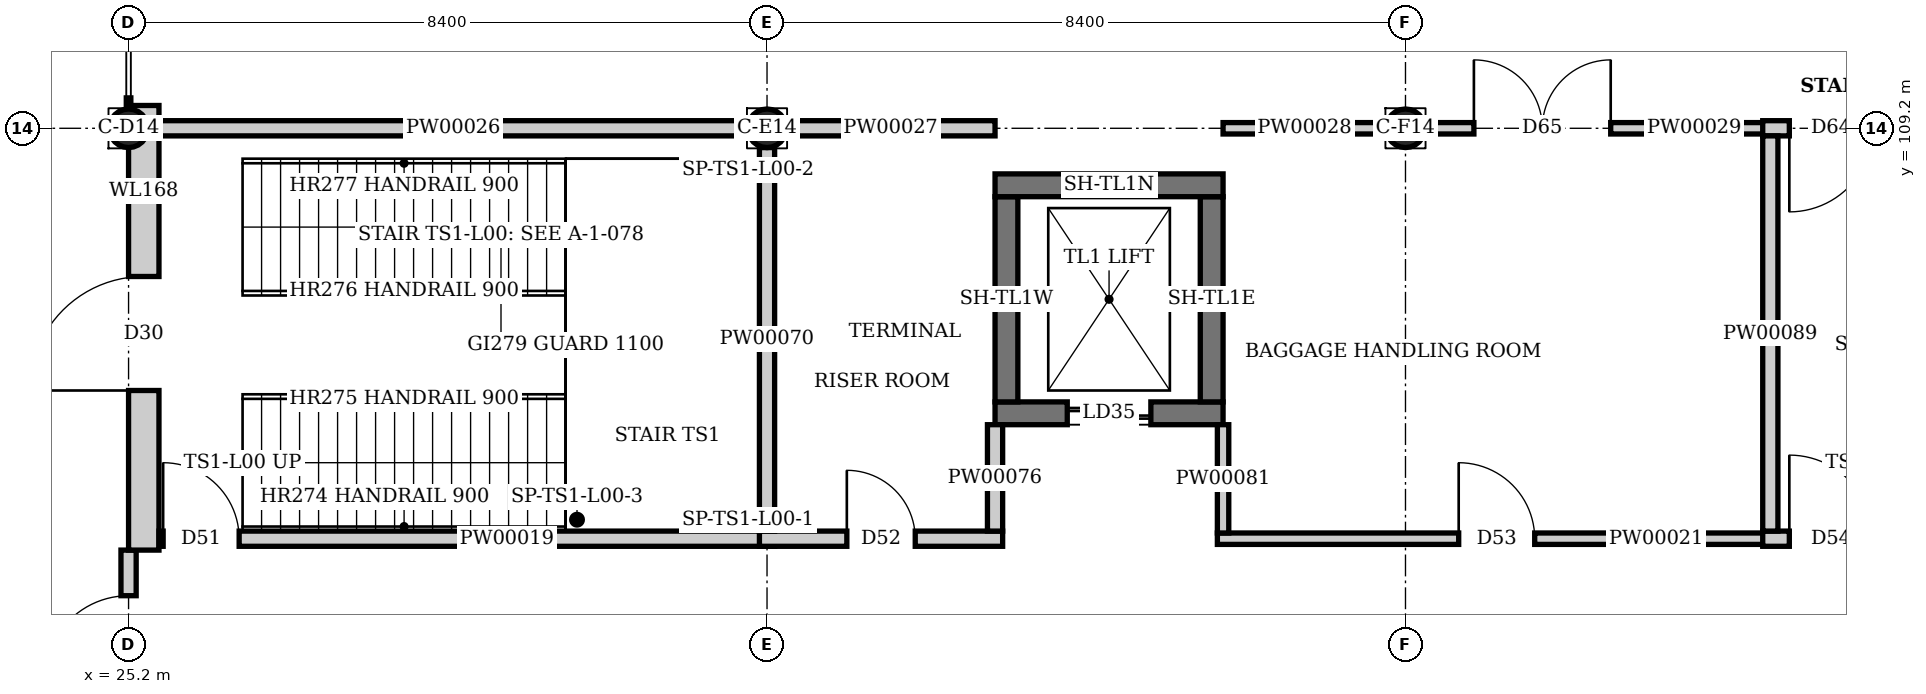
"""IFC4 building model, lengths in metres.
Left out: names, types, materials, properties, quantities, classifications, styles, units other than length and angle.
Written with IfcOpenShell. Run it as: python <this file> out.ifc"""

import sys

from ifc_helpers import new_model, si_unit, direction, frame, frame_2d, origin, origin_2d, place, context, subcontext, project, spatial, rectangle, hollow_circle, extrude, element, fill, save


model = new_model("IFC4")
c1 = context("Model", 3, precision=1e-05, world=origin(), true_north=direction((0.0, 1.0)))
c2 = subcontext(c1, "Body", "Model", "MODEL_VIEW")
j1 = project(units=[si_unit("LENGTHUNIT", "METRE"), si_unit("PLANEANGLEUNIT", "RADIAN")], contexts=[c1])
p1 = place(None, origin())
s1 = spatial("IfcSite", under=j1, at=p1, CompositionType="ELEMENT")
p2 = place(p1, origin())
s2 = spatial("IfcBuilding", under=s1, at=p2, CompositionType="ELEMENT")
p3 = place(p2, origin())
s3 = spatial("IfcBuildingStorey", under=s2, at=p3, CompositionType="ELEMENT", Elevation=0.0)
for number, where, z_axis, x_axis in (
    (1, (25.2, 109.2, -0.7), (0.0, 0.0, 1.0), (1.0, 0.0, 0.0)),
    (2, (33.6, 109.2, -0.7), (0.0, 0.0, 1.0), (1.0, 0.0, 0.0)),
    (3, (42.0, 109.2, -0.7), (0.0, 0.0, 1.0), (1.0, 0.0, 0.0)),
):
    element("IfcColumn", number, at=place(p3, frame(where, z_axis=z_axis, x_axis=x_axis)), inside=s3, PredefinedType="COLUMN", context=c2, shape_type="SweptSolid", body=[
        extrude(hollow_circle(Radius=0.254, WallThickness=0.016, at=origin_2d()), origin(), (0.0, 0.0, 1.0), 6.7),
    ])
p4 = place(p3, frame((36.6, 105.45, -1.6), z_axis=(0.0, 0.0, 1.0), x_axis=(1.0, 0.0, 0.0)))
e4 = element("IfcWall", 4, at=p4, inside=s3, PredefinedType="SHEAR", context=c2, shape_type="SweptSolid", body=[
    extrude(rectangle(XDim=3.0, YDim=0.3, at=frame_2d((1.5, 0.0))), origin(), (0.0, 0.0, 1.0), 7.6),
])
p5 = place(p4, frame((0.95, 0.0, 1.6)))
e5 = element("IfcOpeningElement", 5, at=p5, cuts=e4, PredefinedType="OPENING", context=c2, shape_type="SweptSolid", body=[
    extrude(rectangle(XDim=1.1, YDim=2.1, at=frame_2d((0.55, 1.05))), frame((0.0, 0.16, 0.0), z_axis=(0.0, -1.0, 0.0), x_axis=(1.0, 0.0, 0.0)), (0.0, 0.0, 1.0), 0.32),
])
for number, where, z_axis, x_axis in (
    (6, (39.45, 105.6, -1.6), (0.0, 0.0, 1.0), (0.0, 1.0, 0.0)),
    (7, (36.75, 105.6, -1.6), (0.0, 0.0, 1.0), (0.0, 1.0, 0.0)),
):
    element("IfcWall", number, at=place(p3, frame(where, z_axis=z_axis, x_axis=x_axis)), inside=s3, PredefinedType="SHEAR", context=c2, shape_type="SweptSolid", body=[
        extrude(rectangle(XDim=2.7, YDim=0.3, at=frame_2d((1.35, 0.0))), origin(), (0.0, 0.0, 1.0), 7.6),
    ])
p6 = place(p3, frame((36.6, 108.45, -1.6), z_axis=(0.0, 0.0, 1.0), x_axis=(1.0, 0.0, 0.0)))
e8 = element("IfcWall", 8, at=p6, inside=s3, PredefinedType="SHEAR", context=c2, shape_type="SweptSolid", body=[
    extrude(rectangle(XDim=3.0, YDim=0.3, at=frame_2d((1.5, 0.0))), origin(), (0.0, 0.0, 1.0), 7.6),
])
p7 = place(p3, frame((25.2, 101.35, 0.0), z_axis=(0.0, 0.0, 1.0), x_axis=(0.0, 1.0, 0.0)))
e9 = element("IfcWall", 9, at=p7, inside=s3, PredefinedType="SOLIDWALL", context=c2, shape_type="SweptSolid", body=[
    extrude(rectangle(XDim=2.3, YDim=0.2, at=frame_2d((1.15, 0.0))), origin(), (0.0, 0.0, 1.0), 4.873),
])
p8 = place(p7, frame((0.6, 0.0, 0.0)))
e10 = element("IfcOpeningElement", 10, at=p8, cuts=e9, PredefinedType="OPENING", context=c2, shape_type="SweptSolid", body=[
    extrude(rectangle(XDim=1.1, YDim=2.4, at=frame_2d((0.55, 1.2))), frame((0.0, 0.11, 0.0), z_axis=(0.0, -1.0, 0.0), x_axis=(1.0, 0.0, 0.0)), (0.0, 0.0, 1.0), 0.22),
])
p9 = place(p3, frame((25.4, 103.65, 0.0), z_axis=(0.0, 0.0, 1.0), x_axis=(0.0, 1.0, 0.0)))
e11 = element("IfcWall", 11, at=p9, inside=s3, PredefinedType="SOLIDWALL", context=c2, shape_type="SweptSolid", body=[
    extrude(rectangle(XDim=5.85, YDim=0.4, at=frame_2d((2.925, 0.0))), origin(), (0.0, 0.0, 1.0), 5.8),
])
p10 = place(p9, frame((2.1, 0.0, 0.0)))
e12 = element("IfcOpeningElement", 12, at=p10, cuts=e11, PredefinedType="OPENING", context=c2, shape_type="SweptSolid", body=[
    extrude(rectangle(XDim=1.5, YDim=2.4, at=frame_2d((0.75, 1.2))), frame((0.0, 0.21, 0.0), z_axis=(0.0, -1.0, 0.0), x_axis=(1.0, 0.0, 0.0)), (0.0, 0.0, 1.0), 0.42),
])
p11 = place(p3, frame((25.6, 103.8, 0.0), z_axis=(0.0, 0.0, 1.0), x_axis=(1.0, 0.0, 0.0)))
e13 = element("IfcWall", 13, at=p11, inside=s3, PredefinedType="PARTITIONING", context=c2, shape_type="SweptSolid", body=[
    extrude(rectangle(XDim=8.1, YDim=0.2, at=frame_2d((4.05, 0.0))), origin(), (0.0, 0.0, 1.0), 5.8),
])
p12 = place(p11, frame((0.055, 0.0, 0.0)))
e14 = element("IfcOpeningElement", 14, at=p12, cuts=e13, PredefinedType="OPENING", context=c2, shape_type="SweptSolid", body=[
    extrude(rectangle(XDim=1.0, YDim=2.4, at=frame_2d((0.5, 1.2))), frame((0.0, 0.11, 0.0), z_axis=(0.0, -1.0, 0.0), x_axis=(1.0, 0.0, 0.0)), (0.0, 0.0, 1.0), 0.22),
])
p13 = place(p3, frame((33.5, 103.8, 0.0), z_axis=(0.0, 0.0, 1.0), x_axis=(1.0, 0.0, 0.0)))
e15 = element("IfcWall", 15, at=p13, inside=s3, PredefinedType="PARTITIONING", context=c2, shape_type="SweptSolid", body=[
    extrude(rectangle(XDim=3.2, YDim=0.2, at=frame_2d((1.6, 0.0))), origin(), (0.0, 0.0, 1.0), 5.8),
])
p14 = place(p13, frame((1.15, 0.0, 0.0)))
e16 = element("IfcOpeningElement", 16, at=p14, cuts=e15, PredefinedType="OPENING", context=c2, shape_type="SweptSolid", body=[
    extrude(rectangle(XDim=0.9, YDim=2.1, at=frame_2d((0.45, 1.05))), frame((0.0, 0.11, 0.0), z_axis=(0.0, -1.0, 0.0), x_axis=(1.0, 0.0, 0.0)), (0.0, 0.0, 1.0), 0.22),
])
p15 = place(p3, frame((39.525, 103.8, 0.0), z_axis=(0.0, 0.0, 1.0), x_axis=(1.0, 0.0, 0.0)))
e17 = element("IfcWall", 17, at=p15, inside=s3, PredefinedType="PARTITIONING", context=c2, shape_type="SweptSolid", body=[
    extrude(rectangle(XDim=7.375, YDim=0.15, at=frame_2d((3.688, 0.0))), origin(), (0.0, 0.0, 1.0), 5.8),
])
p16 = place(p15, frame((3.175, 0.0, 0.0)))
e18 = element("IfcOpeningElement", 18, at=p16, cuts=e17, PredefinedType="OPENING", context=c2, shape_type="SweptSolid", body=[
    extrude(rectangle(XDim=1.0, YDim=2.1, at=frame_2d((0.5, 1.05))), frame((0.0, 0.085, 0.0), z_axis=(0.0, -1.0, 0.0), x_axis=(1.0, 0.0, 0.0)), (0.0, 0.0, 1.0), 0.17),
])
p17 = place(p3, frame((46.7, 103.8, 0.0), z_axis=(0.0, 0.0, 1.0), x_axis=(1.0, 0.0, 0.0)))
e19 = element("IfcWall", 19, at=p17, inside=s3, PredefinedType="PARTITIONING", context=c2, shape_type="SweptSolid", body=[
    extrude(rectangle(XDim=15.8, YDim=0.2, at=frame_2d((7.9, 0.0))), origin(), (0.0, 0.0, 1.0), 5.8),
])
p18 = place(p17, frame((0.35, 0.0, 0.0)))
e20 = element("IfcOpeningElement", 20, at=p18, cuts=e19, PredefinedType="OPENING", context=c2, shape_type="SweptSolid", body=[
    extrude(rectangle(XDim=1.1, YDim=2.4, at=frame_2d((0.55, 1.2))), frame((0.0, 0.11, 0.0), z_axis=(0.0, -1.0, 0.0), x_axis=(1.0, 0.0, 0.0)), (0.0, 0.0, 1.0), 0.22),
])
p19 = place(p17, frame((8.15, 0.0, 0.0)))
e21 = element("IfcOpeningElement", 21, at=p19, cuts=e19, PredefinedType="OPENING", context=c2, shape_type="SweptSolid", body=[
    extrude(rectangle(XDim=1.1, YDim=2.4, at=frame_2d((0.55, 1.2))), frame((0.0, 0.11, 0.0), z_axis=(0.0, -1.0, 0.0), x_axis=(1.0, 0.0, 0.0)), (0.0, 0.0, 1.0), 0.22),
])
p20 = place(p3, frame((25.6, 109.2, 0.0), z_axis=(0.0, 0.0, 1.0), x_axis=(1.0, 0.0, 0.0)))
e22 = element("IfcWall", 22, at=p20, inside=s3, PredefinedType="PARTITIONING", context=c2, shape_type="SweptSolid", body=[
    extrude(rectangle(XDim=7.746, YDim=0.2, at=frame_2d((3.873, 0.0))), origin(), (0.0, 0.0, 1.0), 5.346),
])
p21 = place(p3, frame((33.854, 109.2, 0.0), z_axis=(0.0, 0.0, 1.0), x_axis=(1.0, 0.0, 0.0)))
e23 = element("IfcWall", 23, at=p21, inside=s3, PredefinedType="PARTITIONING", context=c2, shape_type="SweptSolid", body=[
    extrude(rectangle(XDim=2.746, YDim=0.2, at=frame_2d((1.373, 0.0))), origin(), (0.0, 0.0, 1.0), 5.346),
])
p22 = place(p3, frame((39.6, 109.2, 0.0), z_axis=(0.0, 0.0, 1.0), x_axis=(1.0, 0.0, 0.0)))
e24 = element("IfcWall", 24, at=p22, inside=s3, PredefinedType="PARTITIONING", context=c2, shape_type="SweptSolid", body=[
    extrude(rectangle(XDim=2.146, YDim=0.15, at=frame_2d((1.073, 0.0))), origin(), (0.0, 0.0, 1.0), 5.346),
])
p23 = place(p3, frame((42.254, 109.2, 0.0), z_axis=(0.0, 0.0, 1.0), x_axis=(1.0, 0.0, 0.0)))
e25 = element("IfcWall", 25, at=p23, inside=s3, PredefinedType="PARTITIONING", context=c2, shape_type="SweptSolid", body=[
    extrude(rectangle(XDim=4.646, YDim=0.15, at=frame_2d((2.323, 0.0))), origin(), (0.0, 0.0, 1.0), 5.346),
])
p24 = place(p23, frame((0.646, 0.0, 0.0)))
e26 = element("IfcOpeningElement", 26, at=p24, cuts=e25, PredefinedType="OPENING", context=c2, shape_type="SweptSolid", body=[
    extrude(rectangle(XDim=1.8, YDim=2.4, at=frame_2d((0.9, 1.2))), frame((0.0, 0.085, 0.0), z_axis=(0.0, -1.0, 0.0), x_axis=(1.0, 0.0, 0.0)), (0.0, 0.0, 1.0), 0.17),
])
p25 = place(p3, frame((46.7, 109.2, 0.0), z_axis=(0.0, 0.0, 1.0), x_axis=(1.0, 0.0, 0.0)))
e27 = element("IfcWall", 27, at=p25, inside=s3, PredefinedType="PARTITIONING", context=c2, shape_type="SweptSolid", body=[
    extrude(rectangle(XDim=3.446, YDim=0.2, at=frame_2d((1.723, 0.0))), origin(), (0.0, 0.0, 1.0), 5.346),
])
p26 = place(p25, frame((0.35, 0.0, 0.0)))
e28 = element("IfcOpeningElement", 28, at=p26, cuts=e27, PredefinedType="OPENING", context=c2, shape_type="SweptSolid", body=[
    extrude(rectangle(XDim=1.1, YDim=2.4, at=frame_2d((0.55, 1.2))), frame((0.0, 0.11, 0.0), z_axis=(0.0, -1.0, 0.0), x_axis=(1.0, 0.0, 0.0)), (0.0, 0.0, 1.0), 0.22),
])
p27 = place(p3, frame((33.6, 103.9, 0.0), z_axis=(0.0, 0.0, 1.0), x_axis=(0.0, 1.0, 0.0)))
e29 = element("IfcWall", 29, at=p27, inside=s3, PredefinedType="PARTITIONING", context=c2, shape_type="SweptSolid", body=[
    extrude(rectangle(XDim=5.046, YDim=0.2, at=frame_2d((2.523, 0.0))), origin(), (0.0, 0.0, 1.0), 5.346),
])
p28 = place(p3, frame((36.6, 103.9, 0.0), z_axis=(0.0, 0.0, 1.0), x_axis=(0.0, 1.0, 0.0)))
e30 = element("IfcWall", 30, at=p28, inside=s3, PredefinedType="PARTITIONING", context=c2, shape_type="SweptSolid", body=[
    extrude(rectangle(XDim=1.4, YDim=0.2, at=frame_2d((0.7, 0.0))), origin(), (0.0, 0.0, 1.0), 5.8),
])
p29 = place(p3, frame((39.6, 103.875, 0.0), z_axis=(0.0, 0.0, 1.0), x_axis=(0.0, 1.0, 0.0)))
e31 = element("IfcWall", 31, at=p29, inside=s3, PredefinedType="PARTITIONING", context=c2, shape_type="SweptSolid", body=[
    extrude(rectangle(XDim=1.425, YDim=0.15, at=frame_2d((0.712, 0.0))), origin(), (0.0, 0.0, 1.0), 5.8),
])
p30 = place(p3, frame((46.8, 103.9, 0.0), z_axis=(0.0, 0.0, 1.0), x_axis=(0.0, 1.0, 0.0)))
e32 = element("IfcWall", 32, at=p30, inside=s3, PredefinedType="PARTITIONING", context=c2, shape_type="SweptSolid", body=[
    extrude(rectangle(XDim=5.2, YDim=0.2, at=frame_2d((2.6, 0.0))), origin(), (0.0, 0.0, 1.0), 5.8),
])
for number, where, z_axis, x_axis in (
    (33, (33.35, 104.05, 0.0), (0.0, 0.0, 1.0), (1.0, 0.0, 0.0)),
    (34, (33.35, 108.65, 0.0), (0.0, 0.0, 1.0), (1.0, 0.0, 0.0)),
    (35, (31.1, 104.05, 0.0), (0.0, 0.0, 1.0), (1.0, 0.0, 0.0)),
):
    element("IfcColumn", number, at=place(p3, frame(where, z_axis=z_axis, x_axis=x_axis)), inside=s3, PredefinedType="COLUMN", context=c2, shape_type="SweptSolid", body=[
        extrude(hollow_circle(Radius=0.07, WallThickness=0.008, at=origin_2d()), origin(), (0.0, 0.0, 1.0), 2.8),
    ])
p31 = place(p8, origin())
e36 = element("IfcDoor", 36, at=p31, inside=s3, OperationType="SINGLE_SWING_LEFT", PredefinedType="DOOR", context=c2, shape_type="SweptSolid", body=[
    extrude(rectangle(XDim=1.1, YDim=2.4, at=frame_2d((0.55, 1.2))), frame((0.0, 0.025, 0.0), z_axis=(0.0, -1.0, 0.0), x_axis=(1.0, 0.0, 0.0)), (0.0, 0.0, 1.0), 0.05),
])
fill(e10, e36)
p32 = place(p10, origin())
e37 = element("IfcDoor", 37, at=p32, inside=s3, OperationType="SINGLE_SWING_LEFT", PredefinedType="DOOR", context=c2, shape_type="SweptSolid", body=[
    extrude(rectangle(XDim=1.5, YDim=2.4, at=frame_2d((0.75, 1.2))), frame((0.0, 0.025, 0.0), z_axis=(0.0, -1.0, 0.0), x_axis=(1.0, 0.0, 0.0)), (0.0, 0.0, 1.0), 0.05),
])
fill(e12, e37)
p33 = place(p12, origin())
e38 = element("IfcDoor", 38, at=p33, inside=s3, OperationType="SINGLE_SWING_LEFT", PredefinedType="DOOR", context=c2, shape_type="SweptSolid", body=[
    extrude(rectangle(XDim=1.0, YDim=2.4, at=frame_2d((0.5, 1.2))), frame((0.0, 0.025, 0.0), z_axis=(0.0, -1.0, 0.0), x_axis=(1.0, 0.0, 0.0)), (0.0, 0.0, 1.0), 0.05),
])
fill(e14, e38)
p34 = place(p14, origin())
e39 = element("IfcDoor", 39, at=p34, inside=s3, OperationType="SINGLE_SWING_LEFT", PredefinedType="DOOR", context=c2, shape_type="SweptSolid", body=[
    extrude(rectangle(XDim=0.9, YDim=2.1, at=frame_2d((0.45, 1.05))), frame((0.0, 0.025, 0.0), z_axis=(0.0, -1.0, 0.0), x_axis=(1.0, 0.0, 0.0)), (0.0, 0.0, 1.0), 0.05),
])
fill(e16, e39)
p35 = place(p16, origin())
e40 = element("IfcDoor", 40, at=p35, inside=s3, OperationType="SINGLE_SWING_LEFT", PredefinedType="DOOR", context=c2, shape_type="SweptSolid", body=[
    extrude(rectangle(XDim=1.0, YDim=2.1, at=frame_2d((0.5, 1.05))), frame((0.0, 0.025, 0.0), z_axis=(0.0, -1.0, 0.0), x_axis=(1.0, 0.0, 0.0)), (0.0, 0.0, 1.0), 0.05),
])
fill(e18, e40)
p36 = place(p18, origin())
e41 = element("IfcDoor", 41, at=p36, inside=s3, OperationType="SINGLE_SWING_LEFT", PredefinedType="DOOR", context=c2, shape_type="SweptSolid", body=[
    extrude(rectangle(XDim=1.1, YDim=2.4, at=frame_2d((0.55, 1.2))), frame((0.0, 0.025, 0.0), z_axis=(0.0, -1.0, 0.0), x_axis=(1.0, 0.0, 0.0)), (0.0, 0.0, 1.0), 0.05),
])
fill(e20, e41)
p37 = place(p26, frame((1.1, 0.0, 0.0), z_axis=(0.0, 0.0, 1.0), x_axis=(-1.0, 0.0, 0.0)))
e42 = element("IfcDoor", 42, at=p37, inside=s3, OperationType="SINGLE_SWING_RIGHT", PredefinedType="DOOR", context=c2, shape_type="SweptSolid", body=[
    extrude(rectangle(XDim=1.1, YDim=2.4, at=frame_2d((0.55, 1.2))), frame((0.0, 0.025, 0.0), z_axis=(0.0, -1.0, 0.0), x_axis=(1.0, 0.0, 0.0)), (0.0, 0.0, 1.0), 0.05),
])
fill(e28, e42)
p38 = place(p24, origin())
e43 = element("IfcDoor", 43, at=p38, inside=s3, OperationType="DOUBLE_DOOR_SINGLE_SWING", PredefinedType="DOOR", context=c2, shape_type="SweptSolid", body=[
    extrude(rectangle(XDim=1.8, YDim=2.4, at=frame_2d((0.9, 1.2))), frame((0.0, 0.025, 0.0), z_axis=(0.0, -1.0, 0.0), x_axis=(1.0, 0.0, 0.0)), (0.0, 0.0, 1.0), 0.05),
])
fill(e26, e43)
p39 = place(p5, origin())
e44 = element("IfcDoor", 44, at=p39, inside=s3, OperationType="SLIDING_TO_LEFT", PredefinedType="DOOR", context=c2, shape_type="SweptSolid", body=[
    extrude(rectangle(XDim=1.1, YDim=2.1, at=frame_2d((0.55, 1.05))), frame((0.0, 0.025, 0.0), z_axis=(0.0, -1.0, 0.0), x_axis=(1.0, 0.0, 0.0)), (0.0, 0.0, 1.0), 0.05),
])
fill(e5, e44)
save(model, sys.argv[1])
